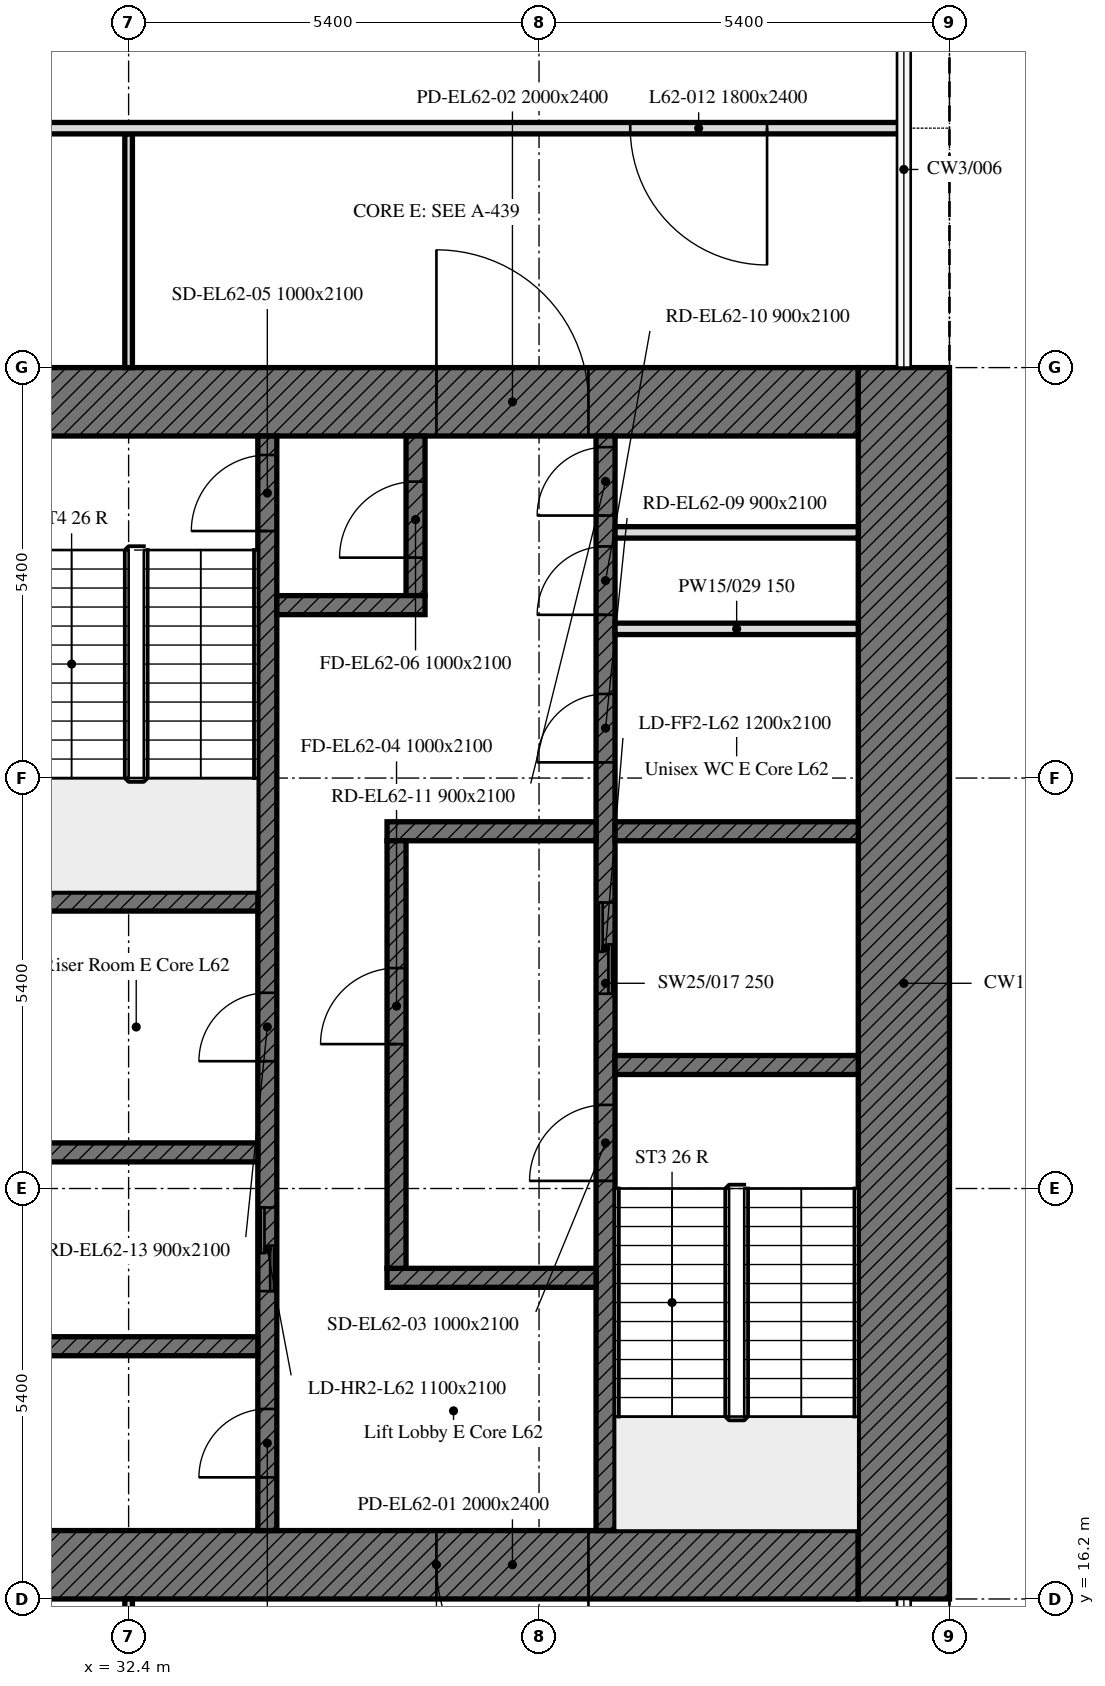
"""IFC4 building model, lengths in metres.
Left out: names, types, materials, properties, quantities, classifications, styles, units other than length and angle.
Written with IfcOpenShell. Run it as: python <this file> out.ifc"""

import sys

from ifc_helpers import new_model, si_unit, direction, frame, frame_2d, origin, place, context, subcontext, project, spatial, rectangle, extrude, element, fill, save


model = new_model("IFC4")
c1 = context("Model", 3, precision=1e-05, world=origin(), true_north=direction((0.0, 1.0)))
c2 = subcontext(c1, "Body", "Model", "MODEL_VIEW")
j1 = project(units=[si_unit("LENGTHUNIT", "METRE"), si_unit("PLANEANGLEUNIT", "RADIAN")], contexts=[c1])
p1 = place(None, origin())
s1 = spatial("IfcSite", under=j1, at=p1, CompositionType="ELEMENT")
p2 = place(p1, origin())
s2 = spatial("IfcBuilding", under=s1, at=p2, CompositionType="ELEMENT")
p3 = place(p2, frame((0.0, 0.0, 255.7)))
s3 = spatial("IfcBuildingStorey", under=s2, at=p3, CompositionType="ELEMENT", Elevation=255.7)
p4 = place(p3, frame((42.0, 16.65, 0.0), z_axis=(0.0, 0.0, 1.0), x_axis=(-1.0, 0.0, 0.0)))
e1 = element("IfcWall", 1, at=p4, inside=s3, PredefinedType="SOLIDWALL", context=c2, shape_type="SweptSolid", body=[
    extrude(rectangle(XDim=11.1, YDim=0.9, at=frame_2d((5.55, 0.0))), origin(), (0.0, 0.0, 1.0), 4.5),
])
p5 = place(p4, frame((3.55, 0.0, 0.0)))
e2 = element("IfcOpeningElement", 2, at=p5, cuts=e1, PredefinedType="OPENING", context=c2, shape_type="SweptSolid", body=[
    extrude(rectangle(XDim=2.0, YDim=2.4, at=frame_2d((1.0, 1.2))), frame((0.0, 0.45, 0.0), z_axis=(0.0, -1.0, 0.0), x_axis=(1.0, 0.0, 0.0)), (0.0, 0.0, 1.0), 0.9),
])
p6 = place(p3, frame((30.9, 31.95, 0.0), z_axis=(0.0, 0.0, 1.0), x_axis=(1.0, 0.0, 0.0)))
e3 = element("IfcWall", 3, at=p6, inside=s3, PredefinedType="SOLIDWALL", context=c2, shape_type="SweptSolid", body=[
    extrude(rectangle(XDim=11.1, YDim=0.9, at=frame_2d((5.55, 0.0))), origin(), (0.0, 0.0, 1.0), 4.5),
])
p7 = place(p6, frame((5.55, 0.0, 0.0)))
e4 = element("IfcOpeningElement", 4, at=p7, cuts=e3, PredefinedType="OPENING", context=c2, shape_type="SweptSolid", body=[
    extrude(rectangle(XDim=2.0, YDim=2.4, at=frame_2d((1.0, 1.2))), frame((0.0, 0.45, 0.0), z_axis=(0.0, -1.0, 0.0), x_axis=(1.0, 0.0, 0.0)), (0.0, 0.0, 1.0), 0.9),
])
p8 = place(p3, frame((42.6, 32.4, 0.0), z_axis=(0.0, 0.0, 1.0), x_axis=(0.0, -1.0, 0.0)))
e5 = element("IfcWall", 5, at=p8, inside=s3, PredefinedType="SOLIDWALL", context=c2, shape_type="SweptSolid", body=[
    extrude(rectangle(XDim=16.2, YDim=1.2, at=frame_2d((8.1, 0.0))), origin(), (0.0, 0.0, 1.0), 4.5),
])
p9 = place(p3, frame((38.675, 17.1, 0.0), z_axis=(0.0, 0.0, 1.0), x_axis=(0.0, 1.0, 0.0)))
e6 = element("IfcWall", 6, at=p9, inside=s3, PredefinedType="SOLIDWALL", context=c2, shape_type="SweptSolid", body=[
    extrude(rectangle(XDim=14.4, YDim=0.25, at=frame_2d((7.2, 0.0))), origin(), (0.0, 0.0, 1.0), 4.5),
])
p10 = place(p9, frame((4.6, 0.0, 0.0)))
e7 = element("IfcOpeningElement", 7, at=p10, cuts=e6, PredefinedType="OPENING", context=c2, shape_type="SweptSolid", body=[
    extrude(rectangle(XDim=1.0, YDim=2.1, at=frame_2d((0.5, 1.05))), frame((0.0, 0.125, 0.0), z_axis=(0.0, -1.0, 0.0), x_axis=(1.0, 0.0, 0.0)), (0.0, 0.0, 1.0), 0.25),
])
p11 = place(p9, frame((7.062, 0.0, 0.0)))
e8 = element("IfcOpeningElement", 8, at=p11, cuts=e6, PredefinedType="OPENING", context=c2, shape_type="SweptSolid", body=[
    extrude(rectangle(XDim=1.2, YDim=2.1, at=frame_2d((0.6, 1.05))), frame((0.0, 0.125, 0.0), z_axis=(0.0, -1.0, 0.0), x_axis=(1.0, 0.0, 0.0)), (0.0, 0.0, 1.0), 0.25),
])
p12 = place(p9, frame((10.106, 0.0, 0.0)))
e9 = element("IfcOpeningElement", 9, at=p12, cuts=e6, PredefinedType="OPENING", context=c2, shape_type="SweptSolid", body=[
    extrude(rectangle(XDim=0.9, YDim=2.1, at=frame_2d((0.45, 1.05))), frame((0.0, 0.125, 0.0), z_axis=(0.0, -1.0, 0.0), x_axis=(1.0, 0.0, 0.0)), (0.0, 0.0, 1.0), 0.25),
])
p13 = place(p9, frame((12.048, 0.0, 0.0)))
e10 = element("IfcOpeningElement", 10, at=p13, cuts=e6, PredefinedType="OPENING", context=c2, shape_type="SweptSolid", body=[
    extrude(rectangle(XDim=0.9, YDim=2.1, at=frame_2d((0.45, 1.05))), frame((0.0, 0.125, 0.0), z_axis=(0.0, -1.0, 0.0), x_axis=(1.0, 0.0, 0.0)), (0.0, 0.0, 1.0), 0.25),
])
p14 = place(p9, frame((13.354, 0.0, 0.0)))
e11 = element("IfcOpeningElement", 11, at=p14, cuts=e6, PredefinedType="OPENING", context=c2, shape_type="SweptSolid", body=[
    extrude(rectangle(XDim=0.9, YDim=2.1, at=frame_2d((0.45, 1.05))), frame((0.0, 0.125, 0.0), z_axis=(0.0, -1.0, 0.0), x_axis=(1.0, 0.0, 0.0)), (0.0, 0.0, 1.0), 0.25),
])
p15 = place(p3, frame((34.225, 17.1, 0.0), z_axis=(0.0, 0.0, 1.0), x_axis=(0.0, 1.0, 0.0)))
e12 = element("IfcWall", 12, at=p15, inside=s3, PredefinedType="SOLIDWALL", context=c2, shape_type="SweptSolid", body=[
    extrude(rectangle(XDim=14.4, YDim=0.25, at=frame_2d((7.2, 0.0))), origin(), (0.0, 0.0, 1.0), 4.5),
])
p16 = place(p15, frame((13.15, 0.0, 0.0)))
e13 = element("IfcOpeningElement", 13, at=p16, cuts=e12, PredefinedType="OPENING", context=c2, shape_type="SweptSolid", body=[
    extrude(rectangle(XDim=1.0, YDim=2.1, at=frame_2d((0.5, 1.05))), frame((0.0, 0.125, 0.0), z_axis=(0.0, -1.0, 0.0), x_axis=(1.0, 0.0, 0.0)), (0.0, 0.0, 1.0), 0.25),
])
p17 = place(p15, frame((3.15, 0.0, 0.0)))
e14 = element("IfcOpeningElement", 14, at=p17, cuts=e12, PredefinedType="OPENING", context=c2, shape_type="SweptSolid", body=[
    extrude(rectangle(XDim=1.1, YDim=2.1, at=frame_2d((0.55, 1.05))), frame((0.0, 0.125, 0.0), z_axis=(0.0, -1.0, 0.0), x_axis=(1.0, 0.0, 0.0)), (0.0, 0.0, 1.0), 0.25),
])
p18 = place(p15, frame((0.7, 0.0, 0.0)))
e15 = element("IfcOpeningElement", 15, at=p18, cuts=e12, PredefinedType="OPENING", context=c2, shape_type="SweptSolid", body=[
    extrude(rectangle(XDim=0.9, YDim=2.1, at=frame_2d((0.45, 1.05))), frame((0.0, 0.125, 0.0), z_axis=(0.0, -1.0, 0.0), x_axis=(1.0, 0.0, 0.0)), (0.0, 0.0, 1.0), 0.25),
])
p19 = place(p15, frame((6.175, 0.0, 0.0)))
e16 = element("IfcOpeningElement", 16, at=p19, cuts=e12, PredefinedType="OPENING", context=c2, shape_type="SweptSolid", body=[
    extrude(rectangle(XDim=0.9, YDim=2.1, at=frame_2d((0.45, 1.05))), frame((0.0, 0.125, 0.0), z_axis=(0.0, -1.0, 0.0), x_axis=(1.0, 0.0, 0.0)), (0.0, 0.0, 1.0), 0.25),
])
p20 = place(p3, frame((38.8, 23.225, 0.0), z_axis=(0.0, 0.0, 1.0), x_axis=(1.0, 0.0, 0.0)))
e17 = element("IfcWall", 17, at=p20, inside=s3, PredefinedType="SOLIDWALL", context=c2, shape_type="SweptSolid", body=[
    extrude(rectangle(XDim=3.2, YDim=0.25, at=frame_2d((1.6, 0.0))), origin(), (0.0, 0.0, 1.0), 4.5),
])
for number, where, z_axis, x_axis in (
    (18, (30.9, 25.375, 0.0), (0.0, 0.0, 1.0), (1.0, 0.0, 0.0)),
    (19, (30.9, 22.075, 0.0), (0.0, 0.0, 1.0), (1.0, 0.0, 0.0)),
):
    element("IfcWall", number, at=place(p3, frame(where, z_axis=z_axis, x_axis=x_axis)), inside=s3, PredefinedType="SOLIDWALL", context=c2, shape_type="SweptSolid", body=[
        extrude(rectangle(XDim=3.2, YDim=0.25, at=frame_2d((1.6, 0.0))), origin(), (0.0, 0.0, 1.0), 4.5),
    ])
p21 = place(p3, frame((38.8, 26.3, 0.0), z_axis=(0.0, 0.0, 1.0), x_axis=(1.0, 0.0, 0.0)))
e20 = element("IfcWall", 20, at=p21, inside=s3, PredefinedType="SOLIDWALL", context=c2, shape_type="SweptSolid", body=[
    extrude(rectangle(XDim=3.2, YDim=0.25, at=frame_2d((1.6, 0.0))), origin(), (0.0, 0.0, 1.0), 4.5),
])
for number, where, z_axis, x_axis in (
    (21, (35.8, 26.3, 0.0), (0.0, 0.0, 1.0), (1.0, 0.0, 0.0)),
    (22, (35.8, 20.425, 0.0), (0.0, 0.0, 1.0), (1.0, 0.0, 0.0)),
):
    element("IfcWall", number, at=place(p3, frame(where, z_axis=z_axis, x_axis=x_axis)), inside=s3, PredefinedType="SOLIDWALL", context=c2, shape_type="SweptSolid", body=[
        extrude(rectangle(XDim=2.75, YDim=0.25, at=frame_2d((1.375, 0.0))), origin(), (0.0, 0.0, 1.0), 4.5),
    ])
p22 = place(p3, frame((36.175, 29.4, 0.0), z_axis=(0.0, 0.0, 1.0), x_axis=(0.0, 1.0, 0.0)))
e23 = element("IfcWall", 23, at=p22, inside=s3, PredefinedType="SOLIDWALL", context=c2, shape_type="SweptSolid", body=[
    extrude(rectangle(XDim=2.1, YDim=0.25, at=frame_2d((1.05, 0.0))), origin(), (0.0, 0.0, 1.0), 4.5),
])
p23 = place(p22, frame((0.5, 0.0, 0.0)))
e24 = element("IfcOpeningElement", 24, at=p23, cuts=e23, PredefinedType="OPENING", context=c2, shape_type="SweptSolid", body=[
    extrude(rectangle(XDim=1.0, YDim=2.1, at=frame_2d((0.5, 1.05))), frame((0.0, 0.125, 0.0), z_axis=(0.0, -1.0, 0.0), x_axis=(1.0, 0.0, 0.0)), (0.0, 0.0, 1.0), 0.25),
])
p24 = place(p3, frame((34.35, 29.275, 0.0), z_axis=(0.0, 0.0, 1.0), x_axis=(1.0, 0.0, 0.0)))
e25 = element("IfcWall", 25, at=p24, inside=s3, PredefinedType="SOLIDWALL", context=c2, shape_type="SweptSolid", body=[
    extrude(rectangle(XDim=1.95, YDim=0.25, at=frame_2d((0.975, 0.0))), origin(), (0.0, 0.0, 1.0), 4.5),
])
p25 = place(p3, frame((35.925, 20.55, 0.0), z_axis=(0.0, 0.0, 1.0), x_axis=(0.0, 1.0, 0.0)))
e26 = element("IfcWall", 26, at=p25, inside=s3, PredefinedType="SOLIDWALL", context=c2, shape_type="SweptSolid", body=[
    extrude(rectangle(XDim=5.625, YDim=0.25, at=frame_2d((2.812, 0.0))), origin(), (0.0, 0.0, 1.0), 4.5),
])
p26 = place(p25, frame((2.95, 0.0, 0.0)))
e27 = element("IfcOpeningElement", 27, at=p26, cuts=e26, PredefinedType="OPENING", context=c2, shape_type="SweptSolid", body=[
    extrude(rectangle(XDim=1.0, YDim=2.1, at=frame_2d((0.5, 1.05))), frame((0.0, 0.125, 0.0), z_axis=(0.0, -1.0, 0.0), x_axis=(1.0, 0.0, 0.0)), (0.0, 0.0, 1.0), 0.25),
])
p27 = place(p3, frame((30.9, 19.525, 0.0), z_axis=(0.0, 0.0, 1.0), x_axis=(1.0, 0.0, 0.0)))
e28 = element("IfcWall", 28, at=p27, inside=s3, PredefinedType="SOLIDWALL", context=c2, shape_type="SweptSolid", body=[
    extrude(rectangle(XDim=3.2, YDim=0.25, at=frame_2d((1.6, 0.0))), origin(), (0.0, 0.0, 1.0), 4.5),
])
for number, where, z_axis, x_axis in (
    (29, (38.8, 28.963, 0.0), (0.0, 0.0, 1.0), (1.0, 0.0, 0.0)),
    (30, (38.8, 30.232, 0.0), (0.0, 0.0, 1.0), (1.0, 0.0, 0.0)),
):
    element("IfcWall", number, at=place(p3, frame(where, z_axis=z_axis, x_axis=x_axis)), inside=s3, PredefinedType="PARTITIONING", context=c2, shape_type="SweptSolid", body=[
        extrude(rectangle(XDim=3.2, YDim=0.15, at=frame_2d((1.6, 0.0))), origin(), (0.0, 0.0, 1.0), 4.5),
    ])
p28 = place(p3, frame((32.4, 32.4, 0.0), z_axis=(0.0, 0.0, 1.0), x_axis=(0.0, 1.0, 0.0)))
e31 = element("IfcWall", 31, at=p28, inside=s3, PredefinedType="PARTITIONING", context=c2, shape_type="SweptSolid", body=[
    extrude(rectangle(XDim=3.075, YDim=0.1, at=frame_2d((1.538, 0.0))), origin(), (0.0, 0.0, 1.0), 4.5),
])
p29 = place(p3, frame((42.6, 35.55, 0.0), z_axis=(0.0, 0.0, 1.0), x_axis=(-1.0, 0.0, 0.0)))
e32 = element("IfcWall", 32, at=p29, inside=s3, PredefinedType="PARTITIONING", context=c2, shape_type="SweptSolid", body=[
    extrude(rectangle(XDim=36.6, YDim=0.15, at=frame_2d((18.3, 0.0))), origin(), (0.0, 0.0, 1.0), 4.5),
])
p30 = place(p29, frame((12.0, 0.0, 0.0)))
e33 = element("IfcOpeningElement", 33, at=p30, cuts=e32, PredefinedType="OPENING", context=c2, shape_type="SweptSolid", body=[
    extrude(rectangle(XDim=1.8, YDim=2.4, at=frame_2d((0.9, 1.2))), frame((0.0, 0.075, 0.0), z_axis=(0.0, -1.0, 0.0), x_axis=(1.0, 0.0, 0.0)), (0.0, 0.0, 1.0), 0.15),
])
p31 = place(p29, frame((17.4, 0.0, 0.0)))
e34 = element("IfcOpeningElement", 34, at=p31, cuts=e32, PredefinedType="OPENING", context=c2, shape_type="SweptSolid", body=[
    extrude(rectangle(XDim=1.8, YDim=2.4, at=frame_2d((0.9, 1.2))), frame((0.0, 0.075, 0.0), z_axis=(0.0, -1.0, 0.0), x_axis=(1.0, 0.0, 0.0)), (0.0, 0.0, 1.0), 0.15),
])
p32 = place(p29, frame((22.8, 0.0, 0.0)))
e35 = element("IfcOpeningElement", 35, at=p32, cuts=e32, PredefinedType="OPENING", context=c2, shape_type="SweptSolid", body=[
    extrude(rectangle(XDim=1.8, YDim=2.4, at=frame_2d((0.9, 1.2))), frame((0.0, 0.075, 0.0), z_axis=(0.0, -1.0, 0.0), x_axis=(1.0, 0.0, 0.0)), (0.0, 0.0, 1.0), 0.15),
])
p33 = place(p29, frame((1.8, 0.0, 0.0)))
e36 = element("IfcOpeningElement", 36, at=p33, cuts=e32, PredefinedType="OPENING", context=c2, shape_type="SweptSolid", body=[
    extrude(rectangle(XDim=1.8, YDim=2.4, at=frame_2d((0.9, 1.2))), frame((0.0, 0.075, 0.0), z_axis=(0.0, -1.0, 0.0), x_axis=(1.0, 0.0, 0.0)), (0.0, 0.0, 1.0), 0.15),
])
p34 = place(p29, frame((28.8, 0.0, 0.0)))
e37 = element("IfcOpeningElement", 37, at=p34, cuts=e32, PredefinedType="OPENING", context=c2, shape_type="SweptSolid", body=[
    extrude(rectangle(XDim=1.8, YDim=2.4, at=frame_2d((0.9, 1.2))), frame((0.0, 0.075, 0.0), z_axis=(0.0, -1.0, 0.0), x_axis=(1.0, 0.0, 0.0)), (0.0, 0.0, 1.0), 0.15),
])
p35 = place(p3, frame((32.4, 11.17, 0.0), z_axis=(0.0, 0.0, 1.0), x_axis=(0.0, 1.0, 0.0)))
e38 = element("IfcWall", 38, at=p35, inside=s3, PredefinedType="PARTITIONING", context=c2, shape_type="SweptSolid", body=[
    extrude(rectangle(XDim=5.03, YDim=0.1, at=frame_2d((2.515, 0.0))), origin(), (0.0, 0.0, 1.0), 3.75),
])
p36 = place(p5, origin())
e39 = element("IfcDoor", 39, at=p36, inside=s3, OperationType="DOUBLE_DOOR_SINGLE_SWING", PredefinedType="DOOR", context=c2, shape_type="SweptSolid", body=[
    extrude(rectangle(XDim=2.0, YDim=2.4, at=frame_2d((1.0, 1.2))), frame((0.0, 0.025, 0.0), z_axis=(0.0, -1.0, 0.0), x_axis=(1.0, 0.0, 0.0)), (0.0, 0.0, 1.0), 0.05),
])
fill(e2, e39)
p37 = place(p7, origin())
e40 = element("IfcDoor", 40, at=p37, inside=s3, OperationType="DOUBLE_DOOR_SINGLE_SWING", PredefinedType="DOOR", context=c2, shape_type="SweptSolid", body=[
    extrude(rectangle(XDim=2.0, YDim=2.4, at=frame_2d((1.0, 1.2))), frame((0.0, 0.025, 0.0), z_axis=(0.0, -1.0, 0.0), x_axis=(1.0, 0.0, 0.0)), (0.0, 0.0, 1.0), 0.05),
])
fill(e4, e40)
p38 = place(p10, origin())
e41 = element("IfcDoor", 41, at=p38, inside=s3, OperationType="SINGLE_SWING_LEFT", PredefinedType="DOOR", context=c2, shape_type="SweptSolid", body=[
    extrude(rectangle(XDim=1.0, YDim=2.1, at=frame_2d((0.5, 1.05))), frame((0.0, 0.025, 0.0), z_axis=(0.0, -1.0, 0.0), x_axis=(1.0, 0.0, 0.0)), (0.0, 0.0, 1.0), 0.05),
])
fill(e7, e41)
p39 = place(p26, origin())
e42 = element("IfcDoor", 42, at=p39, inside=s3, OperationType="SINGLE_SWING_LEFT", PredefinedType="DOOR", context=c2, shape_type="SweptSolid", body=[
    extrude(rectangle(XDim=1.0, YDim=2.1, at=frame_2d((0.5, 1.05))), frame((0.0, 0.025, 0.0), z_axis=(0.0, -1.0, 0.0), x_axis=(1.0, 0.0, 0.0)), (0.0, 0.0, 1.0), 0.05),
])
fill(e27, e42)
p40 = place(p16, origin())
e43 = element("IfcDoor", 43, at=p40, inside=s3, OperationType="SINGLE_SWING_LEFT", PredefinedType="DOOR", context=c2, shape_type="SweptSolid", body=[
    extrude(rectangle(XDim=1.0, YDim=2.1, at=frame_2d((0.5, 1.05))), frame((0.0, 0.025, 0.0), z_axis=(0.0, -1.0, 0.0), x_axis=(1.0, 0.0, 0.0)), (0.0, 0.0, 1.0), 0.05),
])
fill(e13, e43)
p41 = place(p23, origin())
e44 = element("IfcDoor", 44, at=p41, inside=s3, OperationType="SINGLE_SWING_LEFT", PredefinedType="DOOR", context=c2, shape_type="SweptSolid", body=[
    extrude(rectangle(XDim=1.0, YDim=2.1, at=frame_2d((0.5, 1.05))), frame((0.0, 0.025, 0.0), z_axis=(0.0, -1.0, 0.0), x_axis=(1.0, 0.0, 0.0)), (0.0, 0.0, 1.0), 0.05),
])
fill(e24, e44)
p42 = place(p11, origin())
e45 = element("IfcDoor", 45, at=p42, inside=s3, OperationType="DOUBLE_DOOR_SLIDING", PredefinedType="DOOR", context=c2, shape_type="SweptSolid", body=[
    extrude(rectangle(XDim=1.2, YDim=2.1, at=frame_2d((0.6, 1.05))), frame((0.0, 0.025, 0.0), z_axis=(0.0, -1.0, 0.0), x_axis=(1.0, 0.0, 0.0)), (0.0, 0.0, 1.0), 0.05),
])
fill(e8, e45)
p43 = place(p17, origin())
e46 = element("IfcDoor", 46, at=p43, inside=s3, OperationType="DOUBLE_DOOR_SLIDING", PredefinedType="DOOR", context=c2, shape_type="SweptSolid", body=[
    extrude(rectangle(XDim=1.1, YDim=2.1, at=frame_2d((0.55, 1.05))), frame((0.0, 0.025, 0.0), z_axis=(0.0, -1.0, 0.0), x_axis=(1.0, 0.0, 0.0)), (0.0, 0.0, 1.0), 0.05),
])
fill(e14, e46)
p44 = place(p12, origin())
e47 = element("IfcDoor", 47, at=p44, inside=s3, OperationType="SINGLE_SWING_LEFT", PredefinedType="DOOR", context=c2, shape_type="SweptSolid", body=[
    extrude(rectangle(XDim=0.9, YDim=2.1, at=frame_2d((0.45, 1.05))), frame((0.0, 0.025, 0.0), z_axis=(0.0, -1.0, 0.0), x_axis=(1.0, 0.0, 0.0)), (0.0, 0.0, 1.0), 0.05),
])
fill(e9, e47)
p45 = place(p13, origin())
e48 = element("IfcDoor", 48, at=p45, inside=s3, OperationType="SINGLE_SWING_LEFT", PredefinedType="DOOR", context=c2, shape_type="SweptSolid", body=[
    extrude(rectangle(XDim=0.9, YDim=2.1, at=frame_2d((0.45, 1.05))), frame((0.0, 0.025, 0.0), z_axis=(0.0, -1.0, 0.0), x_axis=(1.0, 0.0, 0.0)), (0.0, 0.0, 1.0), 0.05),
])
fill(e10, e48)
p46 = place(p14, origin())
e49 = element("IfcDoor", 49, at=p46, inside=s3, OperationType="SINGLE_SWING_LEFT", PredefinedType="DOOR", context=c2, shape_type="SweptSolid", body=[
    extrude(rectangle(XDim=0.9, YDim=2.1, at=frame_2d((0.45, 1.05))), frame((0.0, 0.025, 0.0), z_axis=(0.0, -1.0, 0.0), x_axis=(1.0, 0.0, 0.0)), (0.0, 0.0, 1.0), 0.05),
])
fill(e11, e49)
p47 = place(p18, origin())
e50 = element("IfcDoor", 50, at=p47, inside=s3, OperationType="SINGLE_SWING_LEFT", PredefinedType="DOOR", context=c2, shape_type="SweptSolid", body=[
    extrude(rectangle(XDim=0.9, YDim=2.1, at=frame_2d((0.45, 1.05))), frame((0.0, 0.025, 0.0), z_axis=(0.0, -1.0, 0.0), x_axis=(1.0, 0.0, 0.0)), (0.0, 0.0, 1.0), 0.05),
])
fill(e15, e50)
p48 = place(p19, origin())
e51 = element("IfcDoor", 51, at=p48, inside=s3, OperationType="SINGLE_SWING_LEFT", PredefinedType="DOOR", context=c2, shape_type="SweptSolid", body=[
    extrude(rectangle(XDim=0.9, YDim=2.1, at=frame_2d((0.45, 1.05))), frame((0.0, 0.025, 0.0), z_axis=(0.0, -1.0, 0.0), x_axis=(1.0, 0.0, 0.0)), (0.0, 0.0, 1.0), 0.05),
])
fill(e16, e51)
p49 = place(p33, origin())
e52 = element("IfcDoor", 52, at=p49, inside=s3, OperationType="DOUBLE_DOOR_SINGLE_SWING", PredefinedType="DOOR", context=c2, shape_type="SweptSolid", body=[
    extrude(rectangle(XDim=1.8, YDim=2.4, at=frame_2d((0.9, 1.2))), frame((0.0, 0.025, 0.0), z_axis=(0.0, -1.0, 0.0), x_axis=(1.0, 0.0, 0.0)), (0.0, 0.0, 1.0), 0.05),
])
fill(e36, e52)
save(model, sys.argv[1])
